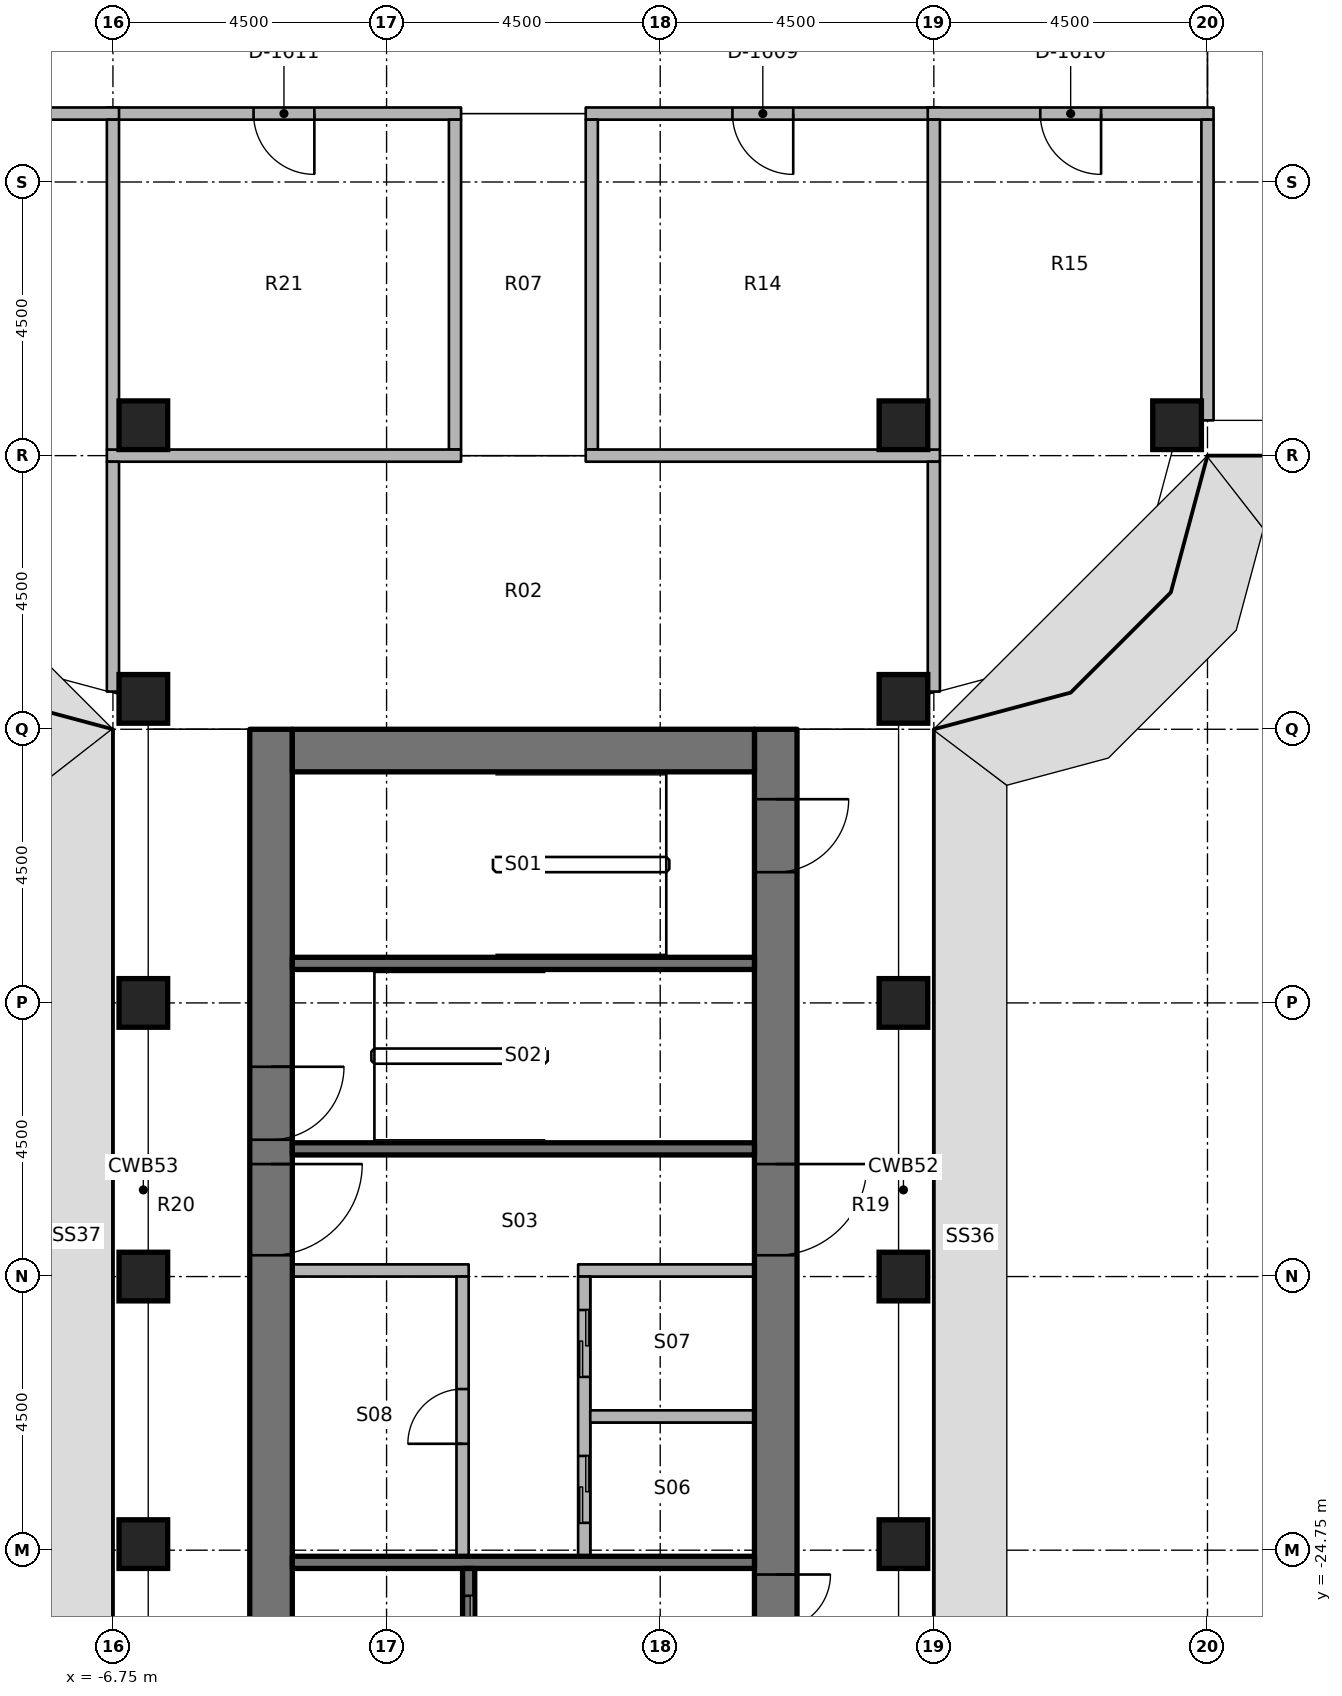
"""IFC4 building model, lengths in metres.
Left out: names, types, materials, properties, quantities, classifications, styles, units other than length and angle.
Written with IfcOpenShell. Run it as: python <this file> out.ifc"""

import sys

from ifc_helpers import new_model, si_unit, direction, frame, frame_2d, origin, origin_2d, place, context, subcontext, project, spatial, rectangle, extrude, element, fill, save


model = new_model("IFC4")
c1 = context("Model", 3, precision=1e-05, world=origin(), true_north=direction((0.0, 1.0)))
c2 = subcontext(c1, "Body", "Model", "MODEL_VIEW")
j1 = project(units=[si_unit("LENGTHUNIT", "METRE"), si_unit("PLANEANGLEUNIT", "RADIAN")], contexts=[c1])
p1 = place(None, origin())
s1 = spatial("IfcSite", under=j1, at=p1, CompositionType="ELEMENT")
p2 = place(p1, origin())
s2 = spatial("IfcBuilding", under=s1, at=p2, CompositionType="ELEMENT")
p3 = place(p2, frame((0.0, 0.0, 156.2)))
s3 = spatial("IfcBuildingStorey", under=s2, at=p3, CompositionType="ELEMENT", Elevation=156.2)
for number, where, z_axis, x_axis in (
    (1, (-6.25, -24.65, 0.0), (0.0, 0.0, 1.0), (1.0, 0.0, 0.0)),
    (2, (-6.25, -20.25, 0.0), (0.0, 0.0, 1.0), (1.0, 0.0, 0.0)),
    (3, (-6.25, -15.75, 0.0), (0.0, 0.0, 1.0), (1.0, 0.0, 0.0)),
    (4, (-6.25, -10.75, 0.0), (0.0, 0.0, 1.0), (1.0, 0.0, 0.0)),
    (5, (-6.25, -6.25, 0.0), (0.0, 0.0, 1.0), (1.0, 0.0, 0.0)),
    (6, (6.25, -24.65, 0.0), (0.0, 0.0, 1.0), (1.0, 0.0, 0.0)),
    (7, (6.25, -20.25, 0.0), (0.0, 0.0, 1.0), (1.0, 0.0, 0.0)),
    (8, (6.25, -15.75, 0.0), (0.0, 0.0, 1.0), (1.0, 0.0, 0.0)),
    (9, (6.25, -10.75, 0.0), (0.0, 0.0, 1.0), (1.0, 0.0, 0.0)),
    (10, (6.25, -6.25, 0.0), (0.0, 0.0, 1.0), (1.0, 0.0, 0.0)),
    (11, (10.75, -6.25, 0.0), (0.0, 0.0, 1.0), (1.0, 0.0, 0.0)),
):
    element("IfcColumn", number, at=place(p3, frame(where, z_axis=z_axis, x_axis=x_axis)), inside=s3, PredefinedType="COLUMN", context=c2, shape_type="SweptSolid", body=[
        extrude(rectangle(XDim=0.8, YDim=0.8, at=origin_2d()), origin(), (0.0, 0.0, 1.0), 3.65),
    ])
p4 = place(p3, frame((-4.15, -11.25, 0.0), z_axis=(0.0, 0.0, 1.0), x_axis=(0.0, -1.0, 0.0)))
e12 = element("IfcWall", 12, at=p4, inside=s3, PredefinedType="SHEAR", context=c2, shape_type="SweptSolid", body=[
    extrude(rectangle(XDim=15.0, YDim=0.7, at=frame_2d((7.5, 0.0))), origin(), (0.0, 0.0, 1.0), 3.8),
])
p5 = place(p4, frame((7.15, 0.0, 0.0)))
e13 = element("IfcOpeningElement", 13, at=p5, cuts=e12, PredefinedType="OPENING", context=c2, shape_type="SweptSolid", body=[
    extrude(rectangle(XDim=1.5, YDim=2.3, at=frame_2d((0.75, 1.15))), frame((0.0, 0.36, 0.0), z_axis=(0.0, -1.0, 0.0), x_axis=(1.0, 0.0, 0.0)), (0.0, 0.0, 1.0), 0.72),
])
p6 = place(p4, frame((5.55, 0.0, 0.0)))
e14 = element("IfcOpeningElement", 14, at=p6, cuts=e12, PredefinedType="OPENING", context=c2, shape_type="SweptSolid", body=[
    extrude(rectangle(XDim=1.2, YDim=2.1, at=frame_2d((0.6, 1.05))), frame((0.0, 0.36, 0.0), z_axis=(0.0, -1.0, 0.0), x_axis=(1.0, 0.0, 0.0)), (0.0, 0.0, 1.0), 0.72),
])
p7 = place(p3, frame((4.15, -11.25, 0.0), z_axis=(0.0, 0.0, 1.0), x_axis=(0.0, -1.0, 0.0)))
e15 = element("IfcWall", 15, at=p7, inside=s3, PredefinedType="SHEAR", context=c2, shape_type="SweptSolid", body=[
    extrude(rectangle(XDim=15.0, YDim=0.7, at=frame_2d((7.5, 0.0))), origin(), (0.0, 0.0, 1.0), 3.8),
])
p8 = place(p7, frame((7.15, 0.0, 0.0)))
e16 = element("IfcOpeningElement", 16, at=p8, cuts=e15, PredefinedType="OPENING", context=c2, shape_type="SweptSolid", body=[
    extrude(rectangle(XDim=1.5, YDim=2.3, at=frame_2d((0.75, 1.15))), frame((0.0, 0.36, 0.0), z_axis=(0.0, -1.0, 0.0), x_axis=(1.0, 0.0, 0.0)), (0.0, 0.0, 1.0), 0.72),
])
p9 = place(p7, frame((13.9, 0.0, 0.0)))
e17 = element("IfcOpeningElement", 17, at=p9, cuts=e15, PredefinedType="OPENING", context=c2, shape_type="SweptSolid", body=[
    extrude(rectangle(XDim=0.9, YDim=2.1, at=frame_2d((0.45, 1.05))), frame((0.0, 0.36, 0.0), z_axis=(0.0, -1.0, 0.0), x_axis=(1.0, 0.0, 0.0)), (0.0, 0.0, 1.0), 0.72),
])
p10 = place(p7, frame((1.15, 0.0, 0.0)))
e18 = element("IfcOpeningElement", 18, at=p10, cuts=e15, PredefinedType="OPENING", context=c2, shape_type="SweptSolid", body=[
    extrude(rectangle(XDim=1.2, YDim=2.1, at=frame_2d((0.6, 1.05))), frame((0.0, 0.36, 0.0), z_axis=(0.0, -1.0, 0.0), x_axis=(1.0, 0.0, 0.0)), (0.0, 0.0, 1.0), 0.72),
])
p11 = place(p3, frame((-3.8, -11.6, 0.0), z_axis=(0.0, 0.0, 1.0), x_axis=(1.0, 0.0, 0.0)))
e19 = element("IfcWall", 19, at=p11, inside=s3, PredefinedType="SHEAR", context=c2, shape_type="SweptSolid", body=[
    extrude(rectangle(XDim=7.6, YDim=0.7, at=frame_2d((3.8, 0.0))), origin(), (0.0, 0.0, 1.0), 3.8),
])
p12 = place(p3, frame((3.8, -24.95, 0.0), z_axis=(0.0, 0.0, 1.0), x_axis=(-1.0, 0.0, 0.0)))
e20 = element("IfcWall", 20, at=p12, inside=s3, PredefinedType="SHEAR", context=c2, shape_type="SweptSolid", body=[
    extrude(rectangle(XDim=7.6, YDim=0.2, at=frame_2d((3.8, 0.0))), origin(), (0.0, 0.0, 1.0), 3.65),
])
p13 = place(p3, frame((-0.9, -27.3, 0.0), z_axis=(0.0, 0.0, 1.0), x_axis=(0.0, 1.0, 0.0)))
e21 = element("IfcWall", 21, at=p13, inside=s3, PredefinedType="SHEAR", context=c2, shape_type="SweptSolid", body=[
    extrude(rectangle(XDim=2.25, YDim=0.2, at=frame_2d((1.125, 0.0))), origin(), (0.0, 0.0, 1.0), 3.65),
])
p14 = place(p13, frame((0.7, 0.0, 0.0)))
e22 = element("IfcOpeningElement", 22, at=p14, cuts=e21, PredefinedType="OPENING", context=c2, shape_type="SweptSolid", body=[
    extrude(rectangle(XDim=1.1, YDim=2.3, at=frame_2d((0.55, 1.15))), frame((0.0, 0.11, 0.0), z_axis=(0.0, -1.0, 0.0), x_axis=(1.0, 0.0, 0.0)), (0.0, 0.0, 1.0), 0.22),
])
for number, where, z_axis, x_axis in (
    (23, (3.8, -18.15, 0.0), (0.0, 0.0, 1.0), (-1.0, 0.0, 0.0)),
    (24, (3.8, -15.1, 0.0), (0.0, 0.0, 1.0), (-1.0, 0.0, 0.0)),
):
    element("IfcWall", number, at=place(p3, frame(where, z_axis=z_axis, x_axis=x_axis)), inside=s3, PredefinedType="SHEAR", context=c2, shape_type="SweptSolid", body=[
        extrude(rectangle(XDim=7.6, YDim=0.2, at=frame_2d((3.8, 0.0))), origin(), (0.0, 0.0, 1.0), 3.65),
    ])
p15 = place(p3, frame((3.8, -20.15, 0.0), z_axis=(0.0, 0.0, 1.0), x_axis=(-1.0, 0.0, 0.0)))
e25 = element("IfcWall", 25, at=p15, inside=s3, PredefinedType="PARTITIONING", context=c2, shape_type="SweptSolid", body=[
    extrude(rectangle(XDim=2.9, YDim=0.2, at=frame_2d((1.45, 0.0))), origin(), (0.0, 0.0, 1.0), 3.65),
])
p16 = place(p3, frame((1.0, -24.85, 0.0), z_axis=(0.0, 0.0, 1.0), x_axis=(0.0, 1.0, 0.0)))
e26 = element("IfcWall", 26, at=p16, inside=s3, PredefinedType="PARTITIONING", context=c2, shape_type="SweptSolid", body=[
    extrude(rectangle(XDim=4.6, YDim=0.2, at=frame_2d((2.3, 0.0))), origin(), (0.0, 0.0, 1.0), 3.65),
])
p17 = place(p16, frame((0.55, 0.0, 0.0)))
e27 = element("IfcOpeningElement", 27, at=p17, cuts=e26, PredefinedType="OPENING", context=c2, shape_type="SweptSolid", body=[
    extrude(rectangle(XDim=1.1, YDim=2.3, at=frame_2d((0.55, 1.15))), frame((0.0, 0.11, 0.0), z_axis=(0.0, -1.0, 0.0), x_axis=(1.0, 0.0, 0.0)), (0.0, 0.0, 1.0), 0.22),
])
p18 = place(p16, frame((2.95, 0.0, 0.0)))
e28 = element("IfcOpeningElement", 28, at=p18, cuts=e26, PredefinedType="OPENING", context=c2, shape_type="SweptSolid", body=[
    extrude(rectangle(XDim=1.1, YDim=2.3, at=frame_2d((0.55, 1.15))), frame((0.0, 0.11, 0.0), z_axis=(0.0, -1.0, 0.0), x_axis=(1.0, 0.0, 0.0)), (0.0, 0.0, 1.0), 0.22),
])
p19 = place(p3, frame((-0.9, -20.15, 0.0), z_axis=(0.0, 0.0, 1.0), x_axis=(-1.0, 0.0, 0.0)))
e29 = element("IfcWall", 29, at=p19, inside=s3, PredefinedType="PARTITIONING", context=c2, shape_type="SweptSolid", body=[
    extrude(rectangle(XDim=2.9, YDim=0.2, at=frame_2d((1.45, 0.0))), origin(), (0.0, 0.0, 1.0), 3.65),
])
p20 = place(p3, frame((-1.0, -24.85, 0.0), z_axis=(0.0, 0.0, 1.0), x_axis=(0.0, 1.0, 0.0)))
e30 = element("IfcWall", 30, at=p20, inside=s3, PredefinedType="PARTITIONING", context=c2, shape_type="SweptSolid", body=[
    extrude(rectangle(XDim=4.6, YDim=0.2, at=frame_2d((2.3, 0.0))), origin(), (0.0, 0.0, 1.0), 3.65),
])
p21 = place(p20, frame((1.85, 0.0, 0.0)))
e31 = element("IfcOpeningElement", 31, at=p21, cuts=e30, PredefinedType="OPENING", context=c2, shape_type="SweptSolid", body=[
    extrude(rectangle(XDim=0.9, YDim=2.1, at=frame_2d((0.45, 1.05))), frame((0.0, 0.11, 0.0), z_axis=(0.0, -1.0, 0.0), x_axis=(1.0, 0.0, 0.0)), (0.0, 0.0, 1.0), 0.22),
])
p22 = place(p3, frame((3.8, -22.55, 0.0), z_axis=(0.0, 0.0, 1.0), x_axis=(-1.0, 0.0, 0.0)))
e32 = element("IfcWall", 32, at=p22, inside=s3, PredefinedType="PARTITIONING", context=c2, shape_type="SweptSolid", body=[
    extrude(rectangle(XDim=2.7, YDim=0.2, at=frame_2d((1.35, 0.0))), origin(), (0.0, 0.0, 1.0), 3.65),
])
p23 = place(p3, frame((6.85, -1.125, 0.0), z_axis=(0.0, 0.0, 1.0), x_axis=(-1.0, 0.0, 0.0)))
e33 = element("IfcWall", 33, at=p23, inside=s3, PredefinedType="PARTITIONING", context=c2, shape_type="SweptSolid", body=[
    extrude(rectangle(XDim=5.825, YDim=0.2, at=frame_2d((2.913, 0.0))), origin(), (0.0, 0.0, 1.0), 2.75),
])
p24 = place(p23, frame((2.413, 0.0, 0.0)))
e34 = element("IfcOpeningElement", 34, at=p24, cuts=e33, PredefinedType="OPENING", context=c2, shape_type="SweptSolid", body=[
    extrude(rectangle(XDim=1.0, YDim=2.1, at=frame_2d((0.5, 1.05))), frame((0.0, 0.11, 0.0), z_axis=(0.0, -1.0, 0.0), x_axis=(1.0, 0.0, 0.0)), (0.0, 0.0, 1.0), 0.22),
])
p25 = place(p3, frame((11.35, -1.125, 0.0), z_axis=(0.0, 0.0, 1.0), x_axis=(-1.0, 0.0, 0.0)))
e35 = element("IfcWall", 35, at=p25, inside=s3, PredefinedType="PARTITIONING", context=c2, shape_type="SweptSolid", body=[
    extrude(rectangle(XDim=4.7, YDim=0.2, at=frame_2d((2.35, 0.0))), origin(), (0.0, 0.0, 1.0), 2.75),
])
p26 = place(p25, frame((1.85, 0.0, 0.0)))
e36 = element("IfcOpeningElement", 36, at=p26, cuts=e35, PredefinedType="OPENING", context=c2, shape_type="SweptSolid", body=[
    extrude(rectangle(XDim=1.0, YDim=2.1, at=frame_2d((0.5, 1.05))), frame((0.0, 0.11, 0.0), z_axis=(0.0, -1.0, 0.0), x_axis=(1.0, 0.0, 0.0)), (0.0, 0.0, 1.0), 0.22),
])
p27 = place(p3, frame((-1.025, -1.125, 0.0), z_axis=(0.0, 0.0, 1.0), x_axis=(-1.0, 0.0, 0.0)))
e37 = element("IfcWall", 37, at=p27, inside=s3, PredefinedType="PARTITIONING", context=c2, shape_type="SweptSolid", body=[
    extrude(rectangle(XDim=5.825, YDim=0.2, at=frame_2d((2.913, 0.0))), origin(), (0.0, 0.0, 1.0), 2.75),
])
p28 = place(p27, frame((2.413, 0.0, 0.0)))
e38 = element("IfcOpeningElement", 38, at=p28, cuts=e37, PredefinedType="OPENING", context=c2, shape_type="SweptSolid", body=[
    extrude(rectangle(XDim=1.0, YDim=2.1, at=frame_2d((0.5, 1.05))), frame((0.0, 0.11, 0.0), z_axis=(0.0, -1.0, 0.0), x_axis=(1.0, 0.0, 0.0)), (0.0, 0.0, 1.0), 0.22),
])
p29 = place(p3, frame((-6.65, -1.125, 0.0), z_axis=(0.0, 0.0, 1.0), x_axis=(-1.0, 0.0, 0.0)))
e39 = element("IfcWall", 39, at=p29, inside=s3, PredefinedType="PARTITIONING", context=c2, shape_type="SweptSolid", body=[
    extrude(rectangle(XDim=4.7, YDim=0.2, at=frame_2d((2.35, 0.0))), origin(), (0.0, 0.0, 1.0), 2.75),
])
p30 = place(p29, frame((1.85, 0.0, 0.0)))
e40 = element("IfcOpeningElement", 40, at=p30, cuts=e39, PredefinedType="OPENING", context=c2, shape_type="SweptSolid", body=[
    extrude(rectangle(XDim=1.0, YDim=2.1, at=frame_2d((0.5, 1.05))), frame((0.0, 0.11, 0.0), z_axis=(0.0, -1.0, 0.0), x_axis=(1.0, 0.0, 0.0)), (0.0, 0.0, 1.0), 0.22),
])
for number, where, z_axis, x_axis in (
    (41, (1.125, -6.65, 0.0), (0.0, 0.0, 1.0), (0.0, 1.0, 0.0)),
    (42, (-1.125, -6.65, 0.0), (0.0, 0.0, 1.0), (0.0, 1.0, 0.0)),
):
    element("IfcWall", number, at=place(p3, frame(where, z_axis=z_axis, x_axis=x_axis)), inside=s3, PredefinedType="PARTITIONING", context=c2, shape_type="SweptSolid", body=[
        extrude(rectangle(XDim=5.425, YDim=0.2, at=frame_2d((2.712, 0.0))), origin(), (0.0, 0.0, 1.0), 2.75),
    ])
p31 = place(p3, frame((1.025, -6.75, 0.0), z_axis=(0.0, 0.0, 1.0), x_axis=(1.0, 0.0, 0.0)))
e43 = element("IfcWall", 43, at=p31, inside=s3, PredefinedType="PARTITIONING", context=c2, shape_type="SweptSolid", body=[
    extrude(rectangle(XDim=5.825, YDim=0.2, at=frame_2d((2.913, 0.0))), origin(), (0.0, 0.0, 1.0), 2.75),
])
p32 = place(p3, frame((6.75, -10.63, 0.0), z_axis=(0.0, 0.0, 1.0), x_axis=(0.0, 1.0, 0.0)))
e44 = element("IfcWall", 44, at=p32, inside=s3, PredefinedType="PARTITIONING", context=c2, shape_type="SweptSolid", body=[
    extrude(rectangle(XDim=3.78, YDim=0.2, at=frame_2d((1.89, 0.0))), origin(), (0.0, 0.0, 1.0), 2.75),
])
p33 = place(p3, frame((-6.85, -6.75, 0.0), z_axis=(0.0, 0.0, 1.0), x_axis=(1.0, 0.0, 0.0)))
e45 = element("IfcWall", 45, at=p33, inside=s3, PredefinedType="PARTITIONING", context=c2, shape_type="SweptSolid", body=[
    extrude(rectangle(XDim=5.825, YDim=0.2, at=frame_2d((2.913, 0.0))), origin(), (0.0, 0.0, 1.0), 2.75),
])
p34 = place(p3, frame((-6.75, -10.63, 0.0), z_axis=(0.0, 0.0, 1.0), x_axis=(0.0, 1.0, 0.0)))
e46 = element("IfcWall", 46, at=p34, inside=s3, PredefinedType="PARTITIONING", context=c2, shape_type="SweptSolid", body=[
    extrude(rectangle(XDim=3.78, YDim=0.2, at=frame_2d((1.89, 0.0))), origin(), (0.0, 0.0, 1.0), 2.75),
])
p35 = place(p3, frame((6.75, -6.65, 0.0), z_axis=(0.0, 0.0, 1.0), x_axis=(0.0, 1.0, 0.0)))
e47 = element("IfcWall", 47, at=p35, inside=s3, PredefinedType="PARTITIONING", context=c2, shape_type="SweptSolid", body=[
    extrude(rectangle(XDim=5.425, YDim=0.2, at=frame_2d((2.712, 0.0))), origin(), (0.0, 0.0, 1.0), 2.75),
])
p36 = place(p3, frame((11.25, -6.17, 0.0), z_axis=(0.0, 0.0, 1.0), x_axis=(0.0, 1.0, 0.0)))
e48 = element("IfcWall", 48, at=p36, inside=s3, PredefinedType="PARTITIONING", context=c2, shape_type="SweptSolid", body=[
    extrude(rectangle(XDim=4.945, YDim=0.2, at=frame_2d((2.472, 0.0))), origin(), (0.0, 0.0, 1.0), 2.75),
])
p37 = place(p3, frame((-6.75, -6.65, 0.0), z_axis=(0.0, 0.0, 1.0), x_axis=(0.0, 1.0, 0.0)))
e49 = element("IfcWall", 49, at=p37, inside=s3, PredefinedType="PARTITIONING", context=c2, shape_type="SweptSolid", body=[
    extrude(rectangle(XDim=5.425, YDim=0.2, at=frame_2d((2.712, 0.0))), origin(), (0.0, 0.0, 1.0), 2.75),
])
p38 = place(p8, origin())
e50 = element("IfcDoor", 50, at=p38, inside=s3, OperationType="DOUBLE_DOOR_SINGLE_SWING", PredefinedType="DOOR", context=c2, shape_type="SweptSolid", body=[
    extrude(rectangle(XDim=1.5, YDim=2.3, at=frame_2d((0.75, 1.15))), frame((0.0, 0.025, 0.0), z_axis=(0.0, -1.0, 0.0), x_axis=(1.0, 0.0, 0.0)), (0.0, 0.0, 1.0), 0.05),
])
fill(e16, e50)
p39 = place(p5, origin())
e51 = element("IfcDoor", 51, at=p39, inside=s3, OperationType="DOUBLE_DOOR_SINGLE_SWING", PredefinedType="DOOR", context=c2, shape_type="SweptSolid", body=[
    extrude(rectangle(XDim=1.5, YDim=2.3, at=frame_2d((0.75, 1.15))), frame((0.0, 0.025, 0.0), z_axis=(0.0, -1.0, 0.0), x_axis=(1.0, 0.0, 0.0)), (0.0, 0.0, 1.0), 0.05),
])
fill(e13, e51)
p40 = place(p9, origin())
e52 = element("IfcDoor", 52, at=p40, inside=s3, OperationType="SINGLE_SWING_LEFT", PredefinedType="DOOR", context=c2, shape_type="SweptSolid", body=[
    extrude(rectangle(XDim=0.9, YDim=2.1, at=frame_2d((0.45, 1.05))), frame((0.0, 0.025, 0.0), z_axis=(0.0, -1.0, 0.0), x_axis=(1.0, 0.0, 0.0)), (0.0, 0.0, 1.0), 0.05),
])
fill(e17, e52)
p41 = place(p6, origin())
e53 = element("IfcDoor", 53, at=p41, inside=s3, OperationType="SINGLE_SWING_LEFT", PredefinedType="DOOR", context=c2, shape_type="SweptSolid", body=[
    extrude(rectangle(XDim=1.2, YDim=2.1, at=frame_2d((0.6, 1.05))), frame((0.0, 0.025, 0.0), z_axis=(0.0, -1.0, 0.0), x_axis=(1.0, 0.0, 0.0)), (0.0, 0.0, 1.0), 0.05),
])
fill(e14, e53)
p42 = place(p10, origin())
e54 = element("IfcDoor", 54, at=p42, inside=s3, OperationType="SINGLE_SWING_LEFT", PredefinedType="DOOR", context=c2, shape_type="SweptSolid", body=[
    extrude(rectangle(XDim=1.2, YDim=2.1, at=frame_2d((0.6, 1.05))), frame((0.0, 0.025, 0.0), z_axis=(0.0, -1.0, 0.0), x_axis=(1.0, 0.0, 0.0)), (0.0, 0.0, 1.0), 0.05),
])
fill(e18, e54)
p43 = place(p14, origin())
e55 = element("IfcDoor", 55, at=p43, inside=s3, OperationType="DOUBLE_DOOR_SLIDING", PredefinedType="DOOR", context=c2, shape_type="SweptSolid", body=[
    extrude(rectangle(XDim=1.1, YDim=2.3, at=frame_2d((0.55, 1.15))), frame((0.0, 0.025, 0.0), z_axis=(0.0, -1.0, 0.0), x_axis=(1.0, 0.0, 0.0)), (0.0, 0.0, 1.0), 0.05),
])
fill(e22, e55)
p44 = place(p17, origin())
e56 = element("IfcDoor", 56, at=p44, inside=s3, OperationType="DOUBLE_DOOR_SLIDING", PredefinedType="DOOR", context=c2, shape_type="SweptSolid", body=[
    extrude(rectangle(XDim=1.1, YDim=2.3, at=frame_2d((0.55, 1.15))), frame((0.0, 0.025, 0.0), z_axis=(0.0, -1.0, 0.0), x_axis=(1.0, 0.0, 0.0)), (0.0, 0.0, 1.0), 0.05),
])
fill(e27, e56)
p45 = place(p18, origin())
e57 = element("IfcDoor", 57, at=p45, inside=s3, OperationType="DOUBLE_DOOR_SLIDING", PredefinedType="DOOR", context=c2, shape_type="SweptSolid", body=[
    extrude(rectangle(XDim=1.1, YDim=2.3, at=frame_2d((0.55, 1.15))), frame((0.0, 0.025, 0.0), z_axis=(0.0, -1.0, 0.0), x_axis=(1.0, 0.0, 0.0)), (0.0, 0.0, 1.0), 0.05),
])
fill(e28, e57)
p46 = place(p21, origin())
e58 = element("IfcDoor", 58, at=p46, inside=s3, OperationType="SINGLE_SWING_LEFT", PredefinedType="DOOR", context=c2, shape_type="SweptSolid", body=[
    extrude(rectangle(XDim=0.9, YDim=2.1, at=frame_2d((0.45, 1.05))), frame((0.0, 0.025, 0.0), z_axis=(0.0, -1.0, 0.0), x_axis=(1.0, 0.0, 0.0)), (0.0, 0.0, 1.0), 0.05),
])
fill(e31, e58)
p47 = place(p24, origin())
e59 = element("IfcDoor", 59, at=p47, inside=s3, OperationType="SINGLE_SWING_RIGHT", PredefinedType="DOOR", context=c2, shape_type="SweptSolid", body=[
    extrude(rectangle(XDim=1.0, YDim=2.1, at=frame_2d((0.5, 1.05))), frame((0.0, 0.025, 0.0), z_axis=(0.0, -1.0, 0.0), x_axis=(1.0, 0.0, 0.0)), (0.0, 0.0, 1.0), 0.05),
])
fill(e34, e59)
p48 = place(p26, origin())
e60 = element("IfcDoor", 60, at=p48, inside=s3, OperationType="SINGLE_SWING_RIGHT", PredefinedType="DOOR", context=c2, shape_type="SweptSolid", body=[
    extrude(rectangle(XDim=1.0, YDim=2.1, at=frame_2d((0.5, 1.05))), frame((0.0, 0.025, 0.0), z_axis=(0.0, -1.0, 0.0), x_axis=(1.0, 0.0, 0.0)), (0.0, 0.0, 1.0), 0.05),
])
fill(e36, e60)
p49 = place(p28, origin())
e61 = element("IfcDoor", 61, at=p49, inside=s3, OperationType="SINGLE_SWING_RIGHT", PredefinedType="DOOR", context=c2, shape_type="SweptSolid", body=[
    extrude(rectangle(XDim=1.0, YDim=2.1, at=frame_2d((0.5, 1.05))), frame((0.0, 0.025, 0.0), z_axis=(0.0, -1.0, 0.0), x_axis=(1.0, 0.0, 0.0)), (0.0, 0.0, 1.0), 0.05),
])
fill(e38, e61)
save(model, sys.argv[1])
